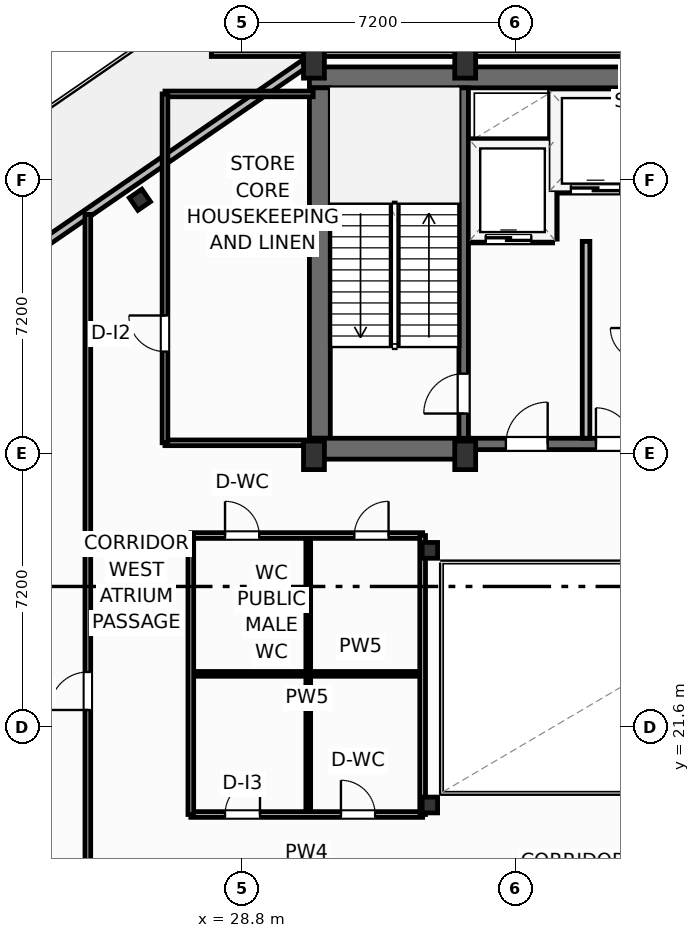
"""IFC4 building model, lengths in metres.
Left out: names, types, materials, properties, quantities, classifications, styles, units other than length and angle.
Written with IfcOpenShell. Run it as: python <this file> out.ifc"""

import sys

from ifc_helpers import new_model, si_unit, direction, frame, frame_2d, origin, origin_2d, place, context, subcontext, project, spatial, rectangle, i_section, extrude, element, fill, save


model = new_model("IFC4")
c1 = context("Model", 3, precision=1e-05, world=origin(), true_north=direction((0.0, 1.0)))
c2 = subcontext(c1, "Body", "Model", "MODEL_VIEW")
j1 = project(units=[si_unit("LENGTHUNIT", "METRE"), si_unit("PLANEANGLEUNIT", "RADIAN")], contexts=[c1])
p1 = place(None, origin())
s1 = spatial("IfcSite", under=j1, at=p1, CompositionType="ELEMENT")
p2 = place(p1, origin())
s2 = spatial("IfcBuilding", under=s1, at=p2, CompositionType="ELEMENT")
p3 = place(p2, frame((0.0, 0.0, 296.3)))
s3 = spatial("IfcBuildingStorey", under=s2, at=p3, CompositionType="ELEMENT", Elevation=296.3)
for number, where, z_axis, x_axis in (
    (1, (30.7, 28.75, 0.0), (0.0, 0.0, 1.0), (1.0, 0.0, 0.0)),
    (2, (34.68, 28.75, 0.0), (0.0, 0.0, 1.0), (1.0, 0.0, 0.0)),
    (3, (30.7, 39.05, 0.0), (0.0, 0.0, 1.0), (1.0, 0.0, 0.0)),
    (4, (34.68, 39.05, 0.0), (0.0, 0.0, 1.0), (1.0, 0.0, 0.0)),
):
    element("IfcColumn", number, at=place(p3, frame(where, z_axis=z_axis, x_axis=x_axis)), inside=s3, PredefinedType="COLUMN", context=c2, shape_type="SweptSolid", body=[
        extrude(rectangle(XDim=0.55, YDim=0.75, at=origin_2d()), origin(), (0.0, 0.0, 1.0), 4.8),
    ])
for number, where, z_axis, x_axis in (
    (5, (33.75, 19.55, 0.0), (0.0, 0.0, 1.0), (1.0, 0.0, 0.0)),
    (6, (33.75, 26.25, 0.0), (0.0, 0.0, 1.0), (1.0, 0.0, 0.0)),
):
    element("IfcColumn", number, at=place(p3, frame(where, z_axis=z_axis, x_axis=x_axis)), inside=s3, PredefinedType="COLUMN", context=c2, shape_type="SweptSolid", body=[
        extrude(i_section(OverallWidth=0.406, OverallDepth=0.416, WebThickness=0.03, FlangeThickness=0.048, FilletRadius=0.025, at=origin_2d()), origin(), (0.0, 0.0, 1.0), 4.8),
    ])
p4 = place(p3, frame((30.58, 38.695, 0.0), z_axis=(0.0, 0.0, 1.0), x_axis=(1.0, 0.0, 0.0)))
e7 = element("IfcWall", 7, at=p4, inside=s3, PredefinedType="SHEAR", context=c2, shape_type="SweptSolid", body=[
    extrude(rectangle(XDim=17.24, YDim=0.55, at=frame_2d((8.62, 0.0))), origin(), (0.0, 0.0, 1.0), 4.55),
])
p5 = place(p3, frame((30.855, 29.2, 0.0), z_axis=(0.0, 0.0, 1.0), x_axis=(0.0, 1.0, 0.0)))
e8 = element("IfcWall", 8, at=p5, inside=s3, PredefinedType="SHEAR", context=c2, shape_type="SweptSolid", body=[
    extrude(rectangle(XDim=9.22, YDim=0.55, at=frame_2d((4.61, 0.0))), origin(), (0.0, 0.0, 1.0), 4.55),
])
p6 = place(p3, frame((30.58, 28.925, 0.0), z_axis=(0.0, 0.0, 1.0), x_axis=(1.0, 0.0, 0.0)))
e9 = element("IfcWall", 9, at=p6, inside=s3, PredefinedType="SHEAR", context=c2, shape_type="SweptSolid", body=[
    extrude(rectangle(XDim=4.22, YDim=0.55, at=frame_2d((2.11, 0.0))), origin(), (0.0, 0.0, 1.0), 4.55),
])
p7 = place(p3, frame((34.8, 29.05, 0.0), z_axis=(0.0, 0.0, 1.0), x_axis=(1.0, 0.0, 0.0)))
e10 = element("IfcWall", 10, at=p7, inside=s3, PredefinedType="SHEAR", context=c2, shape_type="SweptSolid", body=[
    extrude(rectangle(XDim=8.8, YDim=0.3, at=frame_2d((4.4, 0.0))), origin(), (0.0, 0.0, 1.0), 4.55),
])
p8 = place(p7, frame((0.95, 0.0, 0.0)))
e11 = element("IfcOpeningElement", 11, at=p8, cuts=e10, PredefinedType="OPENING", context=c2, shape_type="SweptSolid", body=[
    extrude(rectangle(XDim=1.1, YDim=2.15, at=frame_2d((0.55, 1.075))), frame((0.0, 0.16, 0.0), z_axis=(0.0, -1.0, 0.0), x_axis=(1.0, 0.0, 0.0)), (0.0, 0.0, 1.0), 0.32),
])
p9 = place(p7, frame((6.75, 0.0, 0.0)))
e12 = element("IfcOpeningElement", 12, at=p9, cuts=e10, PredefinedType="OPENING", context=c2, shape_type="SweptSolid", body=[
    extrude(rectangle(XDim=1.1, YDim=2.15, at=frame_2d((0.55, 1.075))), frame((0.0, 0.16, 0.0), z_axis=(0.0, -1.0, 0.0), x_axis=(1.0, 0.0, 0.0)), (0.0, 0.0, 1.0), 0.32),
])
p10 = place(p7, frame((3.32, 0.0, 0.0)))
e13 = element("IfcOpeningElement", 13, at=p10, cuts=e10, PredefinedType="OPENING", context=c2, shape_type="SweptSolid", body=[
    extrude(rectangle(XDim=0.95, YDim=2.15, at=frame_2d((0.475, 1.075))), frame((0.0, 0.16, 0.0), z_axis=(0.0, -1.0, 0.0), x_axis=(1.0, 0.0, 0.0)), (0.0, 0.0, 1.0), 0.32),
])
p11 = place(p3, frame((34.64, 29.2, 0.0), z_axis=(0.0, 0.0, 1.0), x_axis=(0.0, 1.0, 0.0)))
e14 = element("IfcWall", 14, at=p11, inside=s3, PredefinedType="SHEAR", context=c2, shape_type="SweptSolid", body=[
    extrude(rectangle(XDim=9.22, YDim=0.25, at=frame_2d((4.61, 0.0))), origin(), (0.0, 0.0, 1.0), 4.55),
])
p12 = place(p11, frame((0.65, 0.0, 0.0)))
e15 = element("IfcOpeningElement", 15, at=p12, cuts=e14, PredefinedType="OPENING", context=c2, shape_type="SweptSolid", body=[
    extrude(rectangle(XDim=1.05, YDim=2.15, at=frame_2d((0.525, 1.075))), frame((0.0, 0.135, 0.0), z_axis=(0.0, -1.0, 0.0), x_axis=(1.0, 0.0, 0.0)), (0.0, 0.0, 1.0), 0.27),
])
p13 = place(p3, frame((26.119, 35.476, -0.32), z_axis=(0.0, 0.0, 1.0), x_axis=(0.823532597628, 0.567268949127, 0.0)))
e16 = element("IfcColumn", 16, at=p13, inside=s3, PredefinedType="COLUMN", context=c2, shape_type="SweptSolid", body=[
    extrude(i_section(OverallWidth=0.401, OverallDepth=0.399, WebThickness=0.025, FlangeThickness=0.04, FilletRadius=0.022, at=origin_2d()), origin(), (0.0, 0.0, 1.0), 5.12),
])
p14 = place(p3, frame((64.912, 23.23, 0.0), z_axis=(0.0, 0.0, 1.0), x_axis=(-0.823534403617, -0.567266327275, 0.0)))
e17 = element("IfcWall", 17, at=p14, inside=s3, PredefinedType="SOLIDWALL", context=c2, shape_type="SweptSolid", body=[
    extrude(rectangle(XDim=40.0, YDim=0.22, at=frame_2d((20.0, 0.0))), origin(), (0.0, 0.0, 1.0), 3.83),
])
p15 = place(p14, frame((19.025, 0.0, 0.0)))
e18 = element("IfcOpeningElement", 18, at=p15, cuts=e17, PredefinedType="OPENING", context=c2, shape_type="SweptSolid", body=[
    extrude(rectangle(XDim=1.95, YDim=2.35, at=frame_2d((0.975, 1.175))), frame((0.0, 0.12, 0.0), z_axis=(0.0, -1.0, 0.0), x_axis=(1.0, 0.0, 0.0)), (0.0, 0.0, 1.0), 0.24),
])
p16 = place(p14, frame((0.55, 0.0, 0.75)))
e19 = element("IfcOpeningElement", 19, at=p16, cuts=e17, PredefinedType="OPENING", context=c2, shape_type="SweptSolid", body=[
    extrude(rectangle(XDim=2.6, YDim=2.0, at=frame_2d((1.3, 1.0))), frame((0.0, 0.12, 0.0), z_axis=(0.0, -1.0, 0.0), x_axis=(1.0, 0.0, 0.0)), (0.0, 0.0, 1.0), 0.24),
])
p17 = place(p14, frame((36.85, 0.0, 0.75)))
e20 = element("IfcOpeningElement", 20, at=p17, cuts=e17, PredefinedType="OPENING", context=c2, shape_type="SweptSolid", body=[
    extrude(rectangle(XDim=2.6, YDim=2.0, at=frame_2d((1.3, 1.0))), frame((0.0, 0.12, 0.0), z_axis=(0.0, -1.0, 0.0), x_axis=(1.0, 0.0, 0.0)), (0.0, 0.0, 1.0), 0.24),
])
p18 = place(p3, frame((13.489, 27.37, 0.0), z_axis=(0.0, 0.0, 1.0), x_axis=(0.823532439547, 0.567269178622, 0.0)))
e21 = element("IfcWall", 21, at=p18, inside=s3, PredefinedType="SOLIDWALL", context=c2, shape_type="SweptSolid", body=[
    extrude(rectangle(XDim=40.0, YDim=0.22, at=frame_2d((20.0, 0.0))), origin(), (0.0, 0.0, 1.0), 3.83),
])
p19 = place(p18, frame((25.598, 0.0, 0.0)))
e22 = element("IfcOpeningElement", 22, at=p19, cuts=e21, PredefinedType="OPENING", context=c2, shape_type="SweptSolid", body=[
    extrude(rectangle(XDim=1.95, YDim=2.35, at=frame_2d((0.975, 1.175))), frame((0.0, 0.12, 0.0), z_axis=(0.0, -1.0, 0.0), x_axis=(1.0, 0.0, 0.0)), (0.0, 0.0, 1.0), 0.24),
])
p20 = place(p18, frame((0.55, 0.0, 0.75)))
e23 = element("IfcOpeningElement", 23, at=p20, cuts=e21, PredefinedType="OPENING", context=c2, shape_type="SweptSolid", body=[
    extrude(rectangle(XDim=2.6, YDim=2.0, at=frame_2d((1.3, 1.0))), frame((0.0, 0.12, 0.0), z_axis=(0.0, -1.0, 0.0), x_axis=(1.0, 0.0, 0.0)), (0.0, 0.0, 1.0), 0.24),
])
p21 = place(p18, frame((36.85, 0.0, 0.75)))
e24 = element("IfcOpeningElement", 24, at=p21, cuts=e21, PredefinedType="OPENING", context=c2, shape_type="SweptSolid", body=[
    extrude(rectangle(XDim=2.6, YDim=2.0, at=frame_2d((1.3, 1.0))), frame((0.0, 0.12, 0.0), z_axis=(0.0, -1.0, 0.0), x_axis=(1.0, 0.0, 0.0)), (0.0, 0.0, 1.0), 0.24),
])
p22 = place(p3, frame((27.46, 26.64, 0.0), z_axis=(0.0, 0.0, 1.0), x_axis=(1.0, 0.0, 0.0)))
e25 = element("IfcWall", 25, at=p22, inside=s3, PredefinedType="PARTITIONING", context=c2, shape_type="SweptSolid", body=[
    extrude(rectangle(XDim=6.1, YDim=0.15, at=frame_2d((3.05, 0.0))), origin(), (0.0, 0.0, 1.0), 4.55),
])
p23 = place(p22, frame((0.9, 0.0, 0.0)))
e26 = element("IfcOpeningElement", 26, at=p23, cuts=e25, PredefinedType="OPENING", context=c2, shape_type="SweptSolid", body=[
    extrude(rectangle(XDim=0.9, YDim=2.05, at=frame_2d((0.45, 1.025))), frame((0.0, 0.085, 0.0), z_axis=(0.0, -1.0, 0.0), x_axis=(1.0, 0.0, 0.0)), (0.0, 0.0, 1.0), 0.17),
])
p24 = place(p22, frame((4.303, 0.0, 0.0)))
e27 = element("IfcOpeningElement", 27, at=p24, cuts=e25, PredefinedType="OPENING", context=c2, shape_type="SweptSolid", body=[
    extrude(rectangle(XDim=0.9, YDim=2.05, at=frame_2d((0.45, 1.025))), frame((0.0, 0.085, 0.0), z_axis=(0.0, -1.0, 0.0), x_axis=(1.0, 0.0, 0.0)), (0.0, 0.0, 1.0), 0.17),
])
p25 = place(p3, frame((27.46, 19.3, 0.0), z_axis=(0.0, 0.0, 1.0), x_axis=(1.0, 0.0, 0.0)))
e28 = element("IfcWall", 28, at=p25, inside=s3, PredefinedType="PARTITIONING", context=c2, shape_type="SweptSolid", body=[
    extrude(rectangle(XDim=6.1, YDim=0.15, at=frame_2d((3.05, 0.0))), origin(), (0.0, 0.0, 1.0), 3.839),
])
p26 = place(p25, frame((0.9, 0.0, 0.0)))
e29 = element("IfcOpeningElement", 29, at=p26, cuts=e28, PredefinedType="OPENING", context=c2, shape_type="SweptSolid", body=[
    extrude(rectangle(XDim=0.92, YDim=2.05, at=frame_2d((0.46, 1.025))), frame((0.0, 0.085, 0.0), z_axis=(0.0, -1.0, 0.0), x_axis=(1.0, 0.0, 0.0)), (0.0, 0.0, 1.0), 0.17),
])
p27 = place(p25, frame((3.95, 0.0, 0.0)))
e30 = element("IfcOpeningElement", 30, at=p27, cuts=e28, PredefinedType="OPENING", context=c2, shape_type="SweptSolid", body=[
    extrude(rectangle(XDim=0.9, YDim=2.05, at=frame_2d((0.45, 1.025))), frame((0.0, 0.085, 0.0), z_axis=(0.0, -1.0, 0.0), x_axis=(1.0, 0.0, 0.0)), (0.0, 0.0, 1.0), 0.17),
])
p28 = place(p3, frame((30.55, 19.38, 0.0), z_axis=(0.0, 0.0, 1.0), x_axis=(0.0, 1.0, 0.0)))
e31 = element("IfcWall", 31, at=p28, inside=s3, PredefinedType="PARTITIONING", context=c2, shape_type="SweptSolid", body=[
    extrude(rectangle(XDim=7.18, YDim=0.125, at=frame_2d((3.59, 0.0))), origin(), (0.0, 0.0, 1.0), 4.55),
])
p29 = place(p3, frame((27.52, 23.0, 0.0), z_axis=(0.0, 0.0, 1.0), x_axis=(1.0, 0.0, 0.0)))
e32 = element("IfcWall", 32, at=p29, inside=s3, PredefinedType="PARTITIONING", context=c2, shape_type="SweptSolid", body=[
    extrude(rectangle(XDim=6.0, YDim=0.125, at=frame_2d((3.0, 0.0))), origin(), (0.0, 0.0, 1.0), 4.55),
])
p30 = place(p3, frame((27.46, 19.3, 0.0), z_axis=(0.0, 0.0, 1.0), x_axis=(0.0, 1.0, 0.0)))
e33 = element("IfcWall", 33, at=p30, inside=s3, PredefinedType="PARTITIONING", context=c2, shape_type="SweptSolid", body=[
    extrude(rectangle(XDim=7.34, YDim=0.15, at=frame_2d((3.67, 0.0))), origin(), (0.0, 0.0, 1.0), 4.55),
])
p31 = place(p3, frame((33.56, 19.3, 0.0), z_axis=(0.0, 0.0, 1.0), x_axis=(0.0, 1.0, 0.0)))
e34 = element("IfcWall", 34, at=p31, inside=s3, PredefinedType="PARTITIONING", context=c2, shape_type="SweptSolid", body=[
    extrude(rectangle(XDim=7.34, YDim=0.15, at=frame_2d((3.67, 0.0))), origin(), (0.0, 0.0, 1.0), 3.924),
])
p32 = place(p3, frame((24.75, 16.85, 0.0), z_axis=(0.0, 0.0, 1.0), x_axis=(0.0, 1.0, 0.0)))
e35 = element("IfcWall", 35, at=p32, inside=s3, PredefinedType="PARTITIONING", context=c2, shape_type="SweptSolid", body=[
    extrude(rectangle(XDim=18.241, YDim=0.15, at=frame_2d((9.12, 0.0))), origin(), (0.0, 0.0, 1.0), 4.55),
])
p33 = place(p32, frame((5.2, 0.0, 0.0)))
e36 = element("IfcOpeningElement", 36, at=p33, cuts=e35, PredefinedType="OPENING", context=c2, shape_type="SweptSolid", body=[
    extrude(rectangle(XDim=1.0, YDim=2.05, at=frame_2d((0.5, 1.025))), frame((0.0, 0.085, 0.0), z_axis=(0.0, -1.0, 0.0), x_axis=(1.0, 0.0, 0.0)), (0.0, 0.0, 1.0), 0.17),
])
p34 = place(p3, frame((28.0, 39.32, 0.0), z_axis=(0.0, 0.0, 1.0), x_axis=(1.0, 0.0, 0.0)))
e37 = element("IfcWall", 37, at=p34, inside=s3, PredefinedType="PARTITIONING", context=c2, shape_type="SweptSolid", body=[
    extrude(rectangle(XDim=34.0, YDim=0.15, at=frame_2d((17.0, 0.0))), origin(), (0.0, 0.0, 1.0), 4.55),
])
p35 = place(p34, frame((23.75, 0.0, 0.0)))
e38 = element("IfcOpeningElement", 38, at=p35, cuts=e37, PredefinedType="OPENING", context=c2, shape_type="SweptSolid", body=[
    extrude(rectangle(XDim=1.0, YDim=2.05, at=frame_2d((0.5, 1.025))), frame((0.0, 0.085, 0.0), z_axis=(0.0, -1.0, 0.0), x_axis=(1.0, 0.0, 0.0)), (0.0, 0.0, 1.0), 0.17),
])
p36 = place(p3, frame((37.86, 29.2, 0.0), z_axis=(0.0, 0.0, 1.0), x_axis=(0.0, 1.0, 0.0)))
e39 = element("IfcWall", 39, at=p36, inside=s3, PredefinedType="PARTITIONING", context=c2, shape_type="SweptSolid", body=[
    extrude(rectangle(XDim=5.18, YDim=0.2, at=frame_2d((2.59, 0.0))), origin(), (0.0, 0.0, 1.0), 4.55),
])
p37 = place(p3, frame((34.8, 34.44, 0.0), z_axis=(0.0, 0.0, 1.0), x_axis=(1.0, 0.0, 0.0)))
e40 = element("IfcWall", 40, at=p37, inside=s3, PredefinedType="PARTITIONING", context=c2, shape_type="SweptSolid", body=[
    extrude(rectangle(XDim=2.18, YDim=0.2, at=frame_2d((1.09, 0.0))), origin(), (0.0, 0.0, 1.0), 4.55),
])
p38 = place(p37, frame((0.42, 0.0, 0.0)))
e41 = element("IfcOpeningElement", 41, at=p38, cuts=e40, PredefinedType="OPENING", context=c2, shape_type="SweptSolid", body=[
    extrude(rectangle(XDim=1.2, YDim=2.2, at=frame_2d((0.6, 1.1))), frame((0.0, 0.11, 0.0), z_axis=(0.0, -1.0, 0.0), x_axis=(1.0, 0.0, 0.0)), (0.0, 0.0, 1.0), 0.22),
])
p39 = place(p3, frame((34.8, 36.98, 0.0), z_axis=(0.0, 0.0, 1.0), x_axis=(1.0, 0.0, 0.0)))
e42 = element("IfcWall", 42, at=p39, inside=s3, PredefinedType="PARTITIONING", context=c2, shape_type="SweptSolid", body=[
    extrude(rectangle(XDim=2.18, YDim=0.2, at=frame_2d((1.09, 0.0))), origin(), (0.0, 0.0, 1.0), 4.55),
])
p40 = place(p3, frame((37.0, 34.44, 0.0), z_axis=(0.0, 0.0, 1.0), x_axis=(0.0, 1.0, 0.0)))
e43 = element("IfcWall", 43, at=p40, inside=s3, PredefinedType="PARTITIONING", context=c2, shape_type="SweptSolid", body=[
    extrude(rectangle(XDim=3.9, YDim=0.2, at=frame_2d((1.95, 0.0))), origin(), (0.0, 0.0, 1.0), 4.55),
])
p41 = place(p3, frame((37.06, 35.75, 0.0), z_axis=(0.0, 0.0, 1.0), x_axis=(1.0, 0.0, 0.0)))
e44 = element("IfcWall", 44, at=p41, inside=s3, PredefinedType="PARTITIONING", context=c2, shape_type="SweptSolid", body=[
    extrude(rectangle(XDim=2.12, YDim=0.2, at=frame_2d((1.06, 0.0))), origin(), (0.0, 0.0, 1.0), 4.55),
])
p42 = place(p41, frame((0.4, 0.0, 0.0)))
e45 = element("IfcOpeningElement", 45, at=p42, cuts=e44, PredefinedType="OPENING", context=c2, shape_type="SweptSolid", body=[
    extrude(rectangle(XDim=1.3, YDim=2.2, at=frame_2d((0.65, 1.1))), frame((0.0, 0.11, 0.0), z_axis=(0.0, -1.0, 0.0), x_axis=(1.0, 0.0, 0.0)), (0.0, 0.0, 1.0), 0.22),
])
p43 = place(p3, frame((26.78, 29.08, 0.0), z_axis=(0.0, 0.0, 1.0), x_axis=(1.0, 0.0, 0.0)))
e46 = element("IfcWall", 46, at=p43, inside=s3, PredefinedType="PARTITIONING", context=c2, shape_type="SweptSolid", body=[
    extrude(rectangle(XDim=3.8, YDim=0.15, at=frame_2d((1.9, 0.0))), origin(), (0.0, 0.0, 1.0), 3.839),
])
p44 = place(p3, frame((26.78, 38.26, 0.0), z_axis=(0.0, 0.0, 1.0), x_axis=(1.0, 0.0, 0.0)))
e47 = element("IfcWall", 47, at=p44, inside=s3, PredefinedType="PARTITIONING", context=c2, shape_type="SweptSolid", body=[
    extrude(rectangle(XDim=3.9, YDim=0.15, at=frame_2d((1.95, 0.0))), origin(), (0.0, 0.0, 1.0), 4.55),
])
p45 = place(p3, frame((26.78, 29.08, 0.0), z_axis=(0.0, 0.0, 1.0), x_axis=(0.0, 1.0, 0.0)))
e48 = element("IfcWall", 48, at=p45, inside=s3, PredefinedType="PARTITIONING", context=c2, shape_type="SweptSolid", body=[
    extrude(rectangle(XDim=9.18, YDim=0.15, at=frame_2d((4.59, 0.0))), origin(), (0.0, 0.0, 1.0), 4.55),
])
p46 = place(p45, frame((2.4, 0.0, 0.0)))
e49 = element("IfcOpeningElement", 49, at=p46, cuts=e48, PredefinedType="OPENING", context=c2, shape_type="SweptSolid", body=[
    extrude(rectangle(XDim=0.95, YDim=2.05, at=frame_2d((0.475, 1.025))), frame((0.0, 0.085, 0.0), z_axis=(0.0, -1.0, 0.0), x_axis=(1.0, 0.0, 0.0)), (0.0, 0.0, 1.0), 0.17),
])
p47 = place(p23, origin())
e50 = element("IfcDoor", 50, at=p47, inside=s3, OperationType="SINGLE_SWING_LEFT", PredefinedType="DOOR", context=c2, shape_type="SweptSolid", body=[
    extrude(rectangle(XDim=0.9, YDim=2.05, at=frame_2d((0.45, 1.025))), frame((0.0, 0.025, 0.0), z_axis=(0.0, -1.0, 0.0), x_axis=(1.0, 0.0, 0.0)), (0.0, 0.0, 1.0), 0.05),
])
fill(e26, e50)
p48 = place(p24, origin())
e51 = element("IfcDoor", 51, at=p48, inside=s3, OperationType="SINGLE_SWING_RIGHT", PredefinedType="DOOR", context=c2, shape_type="SweptSolid", body=[
    extrude(rectangle(XDim=0.9, YDim=2.05, at=frame_2d((0.45, 1.025))), frame((0.0, 0.025, 0.0), z_axis=(0.0, -1.0, 0.0), x_axis=(1.0, 0.0, 0.0)), (0.0, 0.0, 1.0), 0.05),
])
fill(e27, e51)
p49 = place(p26, origin())
e52 = element("IfcDoor", 52, at=p49, inside=s3, OperationType="SINGLE_SWING_RIGHT", PredefinedType="DOOR", context=c2, shape_type="SweptSolid", body=[
    extrude(rectangle(XDim=0.92, YDim=2.05, at=frame_2d((0.46, 1.025))), frame((0.0, 0.025, 0.0), z_axis=(0.0, -1.0, 0.0), x_axis=(1.0, 0.0, 0.0)), (0.0, 0.0, 1.0), 0.05),
])
fill(e29, e52)
p50 = place(p27, origin())
e53 = element("IfcDoor", 53, at=p50, inside=s3, OperationType="SINGLE_SWING_LEFT", PredefinedType="DOOR", context=c2, shape_type="SweptSolid", body=[
    extrude(rectangle(XDim=0.9, YDim=2.05, at=frame_2d((0.45, 1.025))), frame((0.0, 0.025, 0.0), z_axis=(0.0, -1.0, 0.0), x_axis=(1.0, 0.0, 0.0)), (0.0, 0.0, 1.0), 0.05),
])
fill(e30, e53)
p51 = place(p33, origin())
e54 = element("IfcDoor", 54, at=p51, inside=s3, OperationType="SINGLE_SWING_LEFT", PredefinedType="DOOR", context=c2, shape_type="SweptSolid", body=[
    extrude(rectangle(XDim=1.0, YDim=2.05, at=frame_2d((0.5, 1.025))), frame((0.0, 0.025, 0.0), z_axis=(0.0, -1.0, 0.0), x_axis=(1.0, 0.0, 0.0)), (0.0, 0.0, 1.0), 0.05),
])
fill(e36, e54)
p52 = place(p12, origin())
e55 = element("IfcDoor", 55, at=p52, inside=s3, OperationType="SINGLE_SWING_LEFT", PredefinedType="DOOR", context=c2, shape_type="SweptSolid", body=[
    extrude(rectangle(XDim=1.05, YDim=2.15, at=frame_2d((0.525, 1.075))), frame((0.0, 0.025, 0.0), z_axis=(0.0, -1.0, 0.0), x_axis=(1.0, 0.0, 0.0)), (0.0, 0.0, 1.0), 0.05),
])
fill(e15, e55)
p53 = place(p8, origin())
e56 = element("IfcDoor", 56, at=p53, inside=s3, OperationType="SINGLE_SWING_RIGHT", PredefinedType="DOOR", context=c2, shape_type="SweptSolid", body=[
    extrude(rectangle(XDim=1.1, YDim=2.15, at=frame_2d((0.55, 1.075))), frame((0.0, 0.025, 0.0), z_axis=(0.0, -1.0, 0.0), x_axis=(1.0, 0.0, 0.0)), (0.0, 0.0, 1.0), 0.05),
])
fill(e11, e56)
p54 = place(p38, origin())
e57 = element("IfcDoor", 57, at=p54, inside=s3, OperationType="SLIDING_TO_LEFT", PredefinedType="DOOR", context=c2, shape_type="SweptSolid", body=[
    extrude(rectangle(XDim=1.2, YDim=2.2, at=frame_2d((0.6, 1.1))), frame((0.0, 0.025, 0.0), z_axis=(0.0, -1.0, 0.0), x_axis=(1.0, 0.0, 0.0)), (0.0, 0.0, 1.0), 0.05),
])
fill(e41, e57)
p55 = place(p42, origin())
e58 = element("IfcDoor", 58, at=p55, inside=s3, OperationType="SLIDING_TO_LEFT", PredefinedType="DOOR", context=c2, shape_type="SweptSolid", body=[
    extrude(rectangle(XDim=1.3, YDim=2.2, at=frame_2d((0.65, 1.1))), frame((0.0, 0.025, 0.0), z_axis=(0.0, -1.0, 0.0), x_axis=(1.0, 0.0, 0.0)), (0.0, 0.0, 1.0), 0.05),
])
fill(e45, e58)
p56 = place(p10, origin())
e59 = element("IfcDoor", 59, at=p56, inside=s3, OperationType="SINGLE_SWING_LEFT", PredefinedType="DOOR", context=c2, shape_type="SweptSolid", body=[
    extrude(rectangle(XDim=0.95, YDim=2.15, at=frame_2d((0.475, 1.075))), frame((0.0, 0.025, 0.0), z_axis=(0.0, -1.0, 0.0), x_axis=(1.0, 0.0, 0.0)), (0.0, 0.0, 1.0), 0.05),
])
fill(e13, e59)
p57 = place(p46, origin())
e60 = element("IfcDoor", 60, at=p57, inside=s3, OperationType="SINGLE_SWING_RIGHT", PredefinedType="DOOR", context=c2, shape_type="SweptSolid", body=[
    extrude(rectangle(XDim=0.95, YDim=2.05, at=frame_2d((0.475, 1.025))), frame((0.0, 0.025, 0.0), z_axis=(0.0, -1.0, 0.0), x_axis=(1.0, 0.0, 0.0)), (0.0, 0.0, 1.0), 0.05),
])
fill(e49, e60)
save(model, sys.argv[1])
